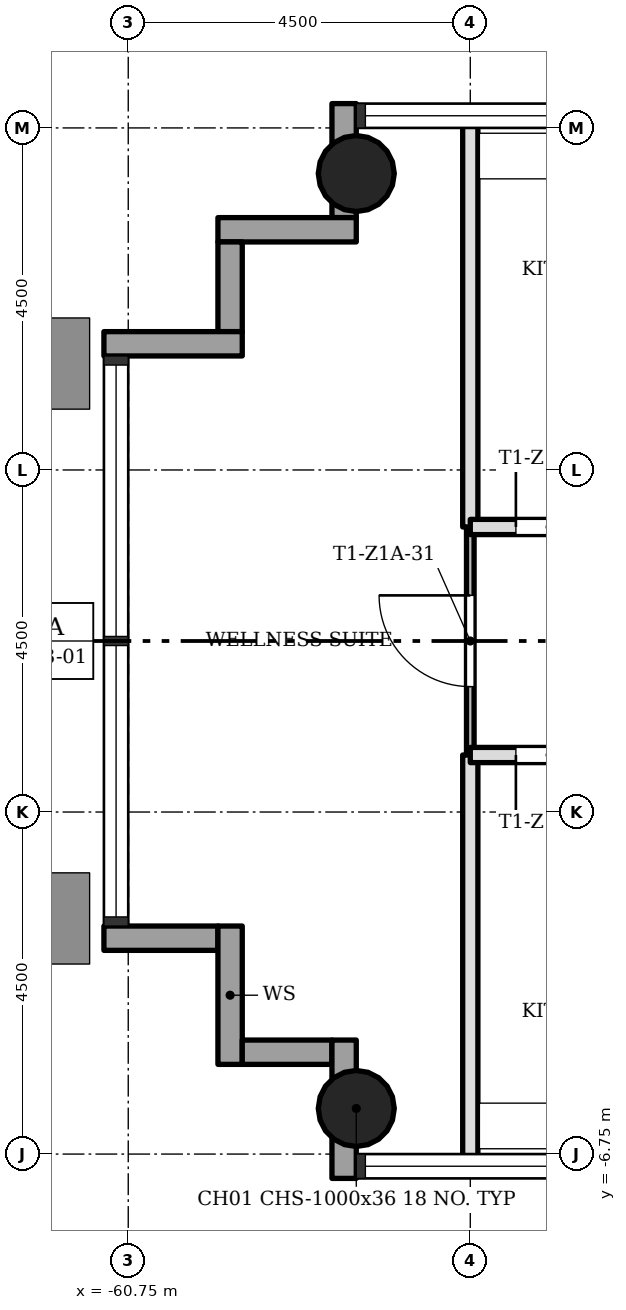
"""IFC4 building model, lengths in metres.
Left out: names, types, materials, properties, quantities, classifications, styles, units other than length and angle.
Written with IfcOpenShell. Run it as: python <this file> out.ifc"""

import sys

from ifc_helpers import new_model, si_unit, direction, frame, frame_2d, origin, origin_2d, place, context, subcontext, project, spatial, rectangle, hollow_circle, extrude, element, fill, save


model = new_model("IFC4")
c1 = context("Model", 3, precision=1e-05, world=origin(), true_north=direction((0.0, 1.0)))
c2 = subcontext(c1, "Body", "Model", "MODEL_VIEW")
j1 = project(units=[si_unit("LENGTHUNIT", "METRE"), si_unit("PLANEANGLEUNIT", "RADIAN")], contexts=[c1])
p1 = place(None, origin())
s1 = spatial("IfcSite", under=j1, at=p1, CompositionType="ELEMENT")
p2 = place(p1, origin())
s2 = spatial("IfcBuilding", under=s1, at=p2, CompositionType="ELEMENT")
p3 = place(p2, frame((0.0, 0.0, 31.3)))
s3 = spatial("IfcBuildingStorey", under=s2, at=p3, CompositionType="ELEMENT", Elevation=31.3)
for number, where, z_axis, x_axis in (
    (1, (-57.75, -6.15, 0.0), (0.0, 0.0, 1.0), (1.0, 0.0, 0.0)),
    (2, (-57.75, 6.15, 0.0), (0.0, 0.0, 1.0), (1.0, 0.0, 0.0)),
):
    element("IfcColumn", number, at=place(p3, frame(where, z_axis=z_axis, x_axis=x_axis)), inside=s3, PredefinedType="COLUMN", context=c2, shape_type="SweptSolid", body=[
        extrude(hollow_circle(Radius=0.5, WallThickness=0.036, at=origin_2d()), origin(), (0.0, 0.0, 1.0), 3.4),
    ])
p4 = place(p3, frame((-61.07, -3.91, -0.3), z_axis=(0.0, 0.0, 1.0), x_axis=(1.0, 0.0, 0.0)))
e3 = element("IfcWall", 3, at=p4, inside=s3, PredefinedType="STANDARD", context=c2, shape_type="SweptSolid", body=[
    extrude(rectangle(XDim=1.5, YDim=0.32, at=frame_2d((0.75, 0.0))), origin(), (0.0, 0.0, 1.0), 3.4),
])
p5 = place(p3, frame((-59.41, -3.75, -0.3), z_axis=(0.0, 0.0, 1.0), x_axis=(0.0, -1.0, 0.0)))
e4 = element("IfcWall", 4, at=p5, inside=s3, PredefinedType="STANDARD", context=c2, shape_type="SweptSolid", body=[
    extrude(rectangle(XDim=1.82, YDim=0.32, at=frame_2d((0.91, 0.0))), origin(), (0.0, 0.0, 1.0), 3.4),
])
p6 = place(p3, frame((-59.25, -5.41, -0.3), z_axis=(0.0, 0.0, 1.0), x_axis=(1.0, 0.0, 0.0)))
e5 = element("IfcWall", 5, at=p6, inside=s3, PredefinedType="STANDARD", context=c2, shape_type="SweptSolid", body=[
    extrude(rectangle(XDim=1.18, YDim=0.32, at=frame_2d((0.59, 0.0))), origin(), (0.0, 0.0, 1.0), 3.4),
])
p7 = place(p3, frame((-57.91, -5.25, -0.3), z_axis=(0.0, 0.0, 1.0), x_axis=(0.0, -1.0, 0.0)))
e6 = element("IfcWall", 6, at=p7, inside=s3, PredefinedType="STANDARD", context=c2, shape_type="SweptSolid", body=[
    extrude(rectangle(XDim=1.82, YDim=0.32, at=frame_2d((0.91, 0.0))), origin(), (0.0, 0.0, 1.0), 3.4),
])
p8 = place(p3, frame((-57.91, 7.07, -0.3), z_axis=(0.0, 0.0, 1.0), x_axis=(0.0, -1.0, 0.0)))
e7 = element("IfcWall", 7, at=p8, inside=s3, PredefinedType="STANDARD", context=c2, shape_type="SweptSolid", body=[
    extrude(rectangle(XDim=1.5, YDim=0.32, at=frame_2d((0.75, 0.0))), origin(), (0.0, 0.0, 1.0), 3.4),
])
p9 = place(p3, frame((-57.75, 5.41, -0.3), z_axis=(0.0, 0.0, 1.0), x_axis=(-1.0, 0.0, 0.0)))
e8 = element("IfcWall", 8, at=p9, inside=s3, PredefinedType="STANDARD", context=c2, shape_type="SweptSolid", body=[
    extrude(rectangle(XDim=1.82, YDim=0.32, at=frame_2d((0.91, 0.0))), origin(), (0.0, 0.0, 1.0), 3.4),
])
p10 = place(p3, frame((-59.41, 5.25, -0.3), z_axis=(0.0, 0.0, 1.0), x_axis=(0.0, -1.0, 0.0)))
e9 = element("IfcWall", 9, at=p10, inside=s3, PredefinedType="STANDARD", context=c2, shape_type="SweptSolid", body=[
    extrude(rectangle(XDim=1.18, YDim=0.32, at=frame_2d((0.59, 0.0))), origin(), (0.0, 0.0, 1.0), 3.4),
])
p11 = place(p3, frame((-59.25, 3.91, -0.3), z_axis=(0.0, 0.0, 1.0), x_axis=(-1.0, 0.0, 0.0)))
e10 = element("IfcWall", 10, at=p11, inside=s3, PredefinedType="STANDARD", context=c2, shape_type="SweptSolid", body=[
    extrude(rectangle(XDim=1.82, YDim=0.32, at=frame_2d((0.91, 0.0))), origin(), (0.0, 0.0, 1.0), 3.4),
])
p12 = place(p3, frame((-56.25, -1.5, 0.0), z_axis=(0.0, 0.0, 1.0), x_axis=(0.0, 1.0, 0.0)))
e11 = element("IfcWall", 11, at=p12, inside=s3, PredefinedType="PARTITIONING", context=c2, shape_type="SweptSolid", body=[
    extrude(rectangle(XDim=3.0, YDim=0.1, at=frame_2d((1.5, 0.0))), origin(), (0.0, 0.0, 1.0), 3.0),
])
p13 = place(p12, frame((0.9, 0.0, 0.0)))
e12 = element("IfcOpeningElement", 12, at=p13, cuts=e11, PredefinedType="OPENING", context=c2, shape_type="SweptSolid", body=[
    extrude(rectangle(XDim=1.2, YDim=2.1, at=frame_2d((0.6, 1.05))), frame((0.0, 0.06, 0.0), z_axis=(0.0, -1.0, 0.0), x_axis=(1.0, 0.0, 0.0)), (0.0, 0.0, 1.0), 0.12),
])
for number, where, z_axis, x_axis in (
    (13, (-56.25, -6.85, 0.0), (0.0, 0.0, 1.0), (0.0, 1.0, 0.0)),
    (14, (-56.25, 1.5, 0.0), (0.0, 0.0, 1.0), (0.0, 1.0, 0.0)),
):
    element("IfcWall", number, at=place(p3, frame(where, z_axis=z_axis, x_axis=x_axis)), inside=s3, PredefinedType="SOLIDWALL", context=c2, shape_type="SweptSolid", body=[
        extrude(rectangle(XDim=5.35, YDim=0.2, at=frame_2d((2.675, 0.0))), origin(), (0.0, 0.0, 1.0), 3.0),
    ])
p14 = place(p3, frame((-56.25, -1.5, 0.0), z_axis=(0.0, 0.0, 1.0), x_axis=(1.0, 0.0, 0.0)))
e15 = element("IfcWall", 15, at=p14, inside=s3, PredefinedType="SOLIDWALL", context=c2, shape_type="SweptSolid", body=[
    extrude(rectangle(XDim=4.5, YDim=0.2, at=frame_2d((2.25, 0.0))), origin(), (0.0, 0.0, 1.0), 3.0),
])
p15 = place(p14, frame((0.6, 0.0, 0.0)))
e16 = element("IfcOpeningElement", 16, at=p15, cuts=e15, PredefinedType="OPENING", context=c2, shape_type="SweptSolid", body=[
    extrude(rectangle(XDim=0.9, YDim=2.1, at=frame_2d((0.45, 1.05))), frame((0.0, 0.11, 0.0), z_axis=(0.0, -1.0, 0.0), x_axis=(1.0, 0.0, 0.0)), (0.0, 0.0, 1.0), 0.22),
])
p16 = place(p3, frame((-56.25, 1.5, 0.0), z_axis=(0.0, 0.0, 1.0), x_axis=(1.0, 0.0, 0.0)))
e17 = element("IfcWall", 17, at=p16, inside=s3, PredefinedType="SOLIDWALL", context=c2, shape_type="SweptSolid", body=[
    extrude(rectangle(XDim=4.5, YDim=0.2, at=frame_2d((2.25, 0.0))), origin(), (0.0, 0.0, 1.0), 3.0),
])
p17 = place(p16, frame((0.6, 0.0, 0.0)))
e18 = element("IfcOpeningElement", 18, at=p17, cuts=e17, PredefinedType="OPENING", context=c2, shape_type="SweptSolid", body=[
    extrude(rectangle(XDim=0.9, YDim=2.1, at=frame_2d((0.45, 1.05))), frame((0.0, 0.11, 0.0), z_axis=(0.0, -1.0, 0.0), x_axis=(1.0, 0.0, 0.0)), (0.0, 0.0, 1.0), 0.22),
])
p18 = place(p15, origin())
e19 = element("IfcDoor", 19, at=p18, inside=s3, OperationType="SINGLE_SWING_LEFT", PredefinedType="DOOR", context=c2, shape_type="SweptSolid", body=[
    extrude(rectangle(XDim=0.9, YDim=2.1, at=frame_2d((0.45, 1.05))), frame((0.0, 0.025, 0.0), z_axis=(0.0, -1.0, 0.0), x_axis=(1.0, 0.0, 0.0)), (0.0, 0.0, 1.0), 0.05),
])
fill(e16, e19)
p19 = place(p17, origin())
e20 = element("IfcDoor", 20, at=p19, inside=s3, OperationType="SINGLE_SWING_RIGHT", PredefinedType="DOOR", context=c2, shape_type="SweptSolid", body=[
    extrude(rectangle(XDim=0.9, YDim=2.1, at=frame_2d((0.45, 1.05))), frame((0.0, 0.025, 0.0), z_axis=(0.0, -1.0, 0.0), x_axis=(1.0, 0.0, 0.0)), (0.0, 0.0, 1.0), 0.05),
])
fill(e18, e20)
p20 = place(p13, origin())
e21 = element("IfcDoor", 21, at=p20, inside=s3, OperationType="SINGLE_SWING_LEFT", PredefinedType="DOOR", context=c2, shape_type="SweptSolid", body=[
    extrude(rectangle(XDim=1.2, YDim=2.1, at=frame_2d((0.6, 1.05))), frame((0.0, 0.025, 0.0), z_axis=(0.0, -1.0, 0.0), x_axis=(1.0, 0.0, 0.0)), (0.0, 0.0, 1.0), 0.05),
])
fill(e12, e21)
save(model, sys.argv[1])
